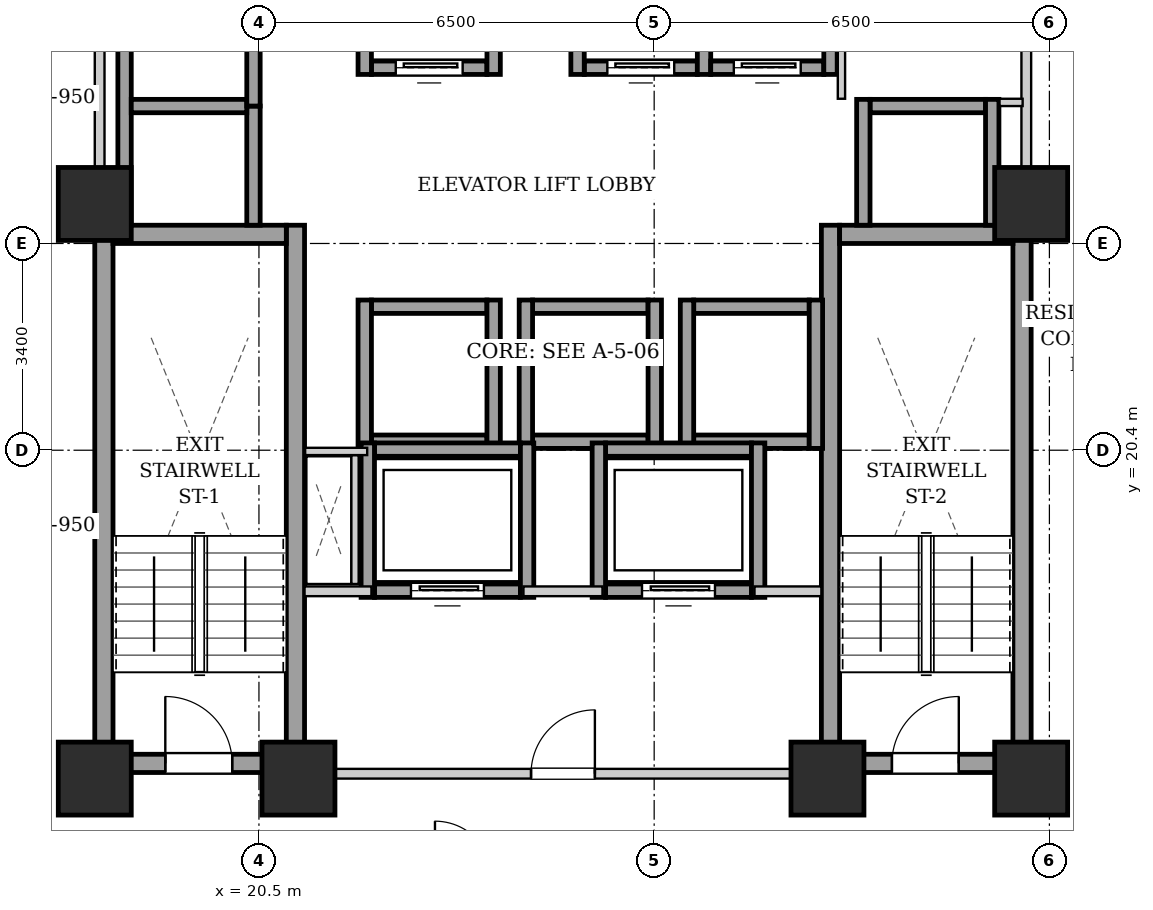
"""IFC4 building model, lengths in metres.
Left out: names, types, materials, properties, quantities, classifications, styles, units other than length and angle.
Written with IfcOpenShell. Run it as: python <this file> out.ifc"""

import sys

from ifc_helpers import new_model, si_unit, direction, frame, frame_2d, origin, origin_2d, place, context, subcontext, project, spatial, rectangle, extrude, element, fill, save


model = new_model("IFC4")
c1 = context("Model", 3, precision=1e-05, world=origin(), true_north=direction((0.0, 1.0)))
c2 = subcontext(c1, "Body", "Model", "MODEL_VIEW")
j1 = project(units=[si_unit("LENGTHUNIT", "METRE"), si_unit("PLANEANGLEUNIT", "RADIAN")], contexts=[c1])
p1 = place(None, origin())
s1 = spatial("IfcSite", under=j1, at=p1, CompositionType="ELEMENT")
p2 = place(p1, origin())
s2 = spatial("IfcBuilding", under=s1, at=p2, CompositionType="ELEMENT")
p3 = place(p2, frame((0.0, 0.0, 41.8)))
s3 = spatial("IfcBuildingStorey", under=s2, at=p3, CompositionType="ELEMENT", Elevation=41.8)
for number, where, z_axis, x_axis in (
    (1, (17.8, 15.0, 0.0), (0.0, 0.0, 1.0), (1.0, 0.0, 0.0)),
    (2, (21.15, 15.0, 0.0), (0.0, 0.0, 1.0), (1.0, 0.0, 0.0)),
    (3, (29.85, 15.0, 0.0), (0.0, 0.0, 1.0), (1.0, 0.0, 0.0)),
    (4, (33.2, 15.0, 0.0), (0.0, 0.0, 1.0), (1.0, 0.0, 0.0)),
    (5, (17.8, 24.45, 0.0), (0.0, 0.0, 1.0), (1.0, 0.0, 0.0)),
    (6, (33.2, 24.45, 0.0), (0.0, 0.0, 1.0), (1.0, 0.0, 0.0)),
):
    element("IfcColumn", number, at=place(p3, frame(where, z_axis=z_axis, x_axis=x_axis)), inside=s3, PredefinedType="COLUMN", context=c2, shape_type="SweptSolid", body=[
        extrude(rectangle(XDim=1.2, YDim=1.2, at=origin_2d()), origin(), (0.0, 0.0, 1.0), 3.2),
    ])
for number, where, z_axis, x_axis in (
    (7, (17.95, 15.1, 0.0), (0.0, 0.0, 1.0), (0.0, 1.0, 0.0)),
    (8, (21.1, 15.1, 0.0), (0.0, 0.0, 1.0), (0.0, 1.0, 0.0)),
):
    element("IfcWall", number, at=place(p3, frame(where, z_axis=z_axis, x_axis=x_axis)), inside=s3, PredefinedType="SHEAR", context=c2, shape_type="SweptSolid", body=[
        extrude(rectangle(XDim=9.0, YDim=0.3, at=frame_2d((4.5, 0.0))), origin(), (0.0, 0.0, 1.0), 2.94),
    ])
p4 = place(p3, frame((18.1, 23.95, 0.0), z_axis=(0.0, 0.0, 1.0), x_axis=(1.0, 0.0, 0.0)))
e9 = element("IfcWall", 9, at=p4, inside=s3, PredefinedType="SHEAR", context=c2, shape_type="SweptSolid", body=[
    extrude(rectangle(XDim=2.85, YDim=0.3, at=frame_2d((1.425, 0.0))), origin(), (0.0, 0.0, 1.0), 2.94),
])
p5 = place(p3, frame((18.1, 15.25, 0.0), z_axis=(0.0, 0.0, 1.0), x_axis=(1.0, 0.0, 0.0)))
e10 = element("IfcWall", 10, at=p5, inside=s3, PredefinedType="SHEAR", context=c2, shape_type="SweptSolid", body=[
    extrude(rectangle(XDim=2.85, YDim=0.3, at=frame_2d((1.425, 0.0))), origin(), (0.0, 0.0, 1.0), 2.94),
])
p6 = place(p5, frame((0.86, 0.0, 0.0)))
e11 = element("IfcOpeningElement", 11, at=p6, cuts=e10, PredefinedType="OPENING", context=c2, shape_type="SweptSolid", body=[
    extrude(rectangle(XDim=1.1, YDim=2.05, at=frame_2d((0.55, 1.025))), frame((0.0, 0.16, 0.0), z_axis=(0.0, -1.0, 0.0), x_axis=(1.0, 0.0, 0.0)), (0.0, 0.0, 1.0), 0.32),
])
for number, where, z_axis, x_axis in (
    (12, (29.9, 15.1, 0.0), (0.0, 0.0, 1.0), (0.0, 1.0, 0.0)),
    (13, (33.05, 15.1, 0.0), (0.0, 0.0, 1.0), (0.0, 1.0, 0.0)),
):
    element("IfcWall", number, at=place(p3, frame(where, z_axis=z_axis, x_axis=x_axis)), inside=s3, PredefinedType="SHEAR", context=c2, shape_type="SweptSolid", body=[
        extrude(rectangle(XDim=9.0, YDim=0.3, at=frame_2d((4.5, 0.0))), origin(), (0.0, 0.0, 1.0), 2.94),
    ])
p7 = place(p3, frame((30.05, 23.95, 0.0), z_axis=(0.0, 0.0, 1.0), x_axis=(1.0, 0.0, 0.0)))
e14 = element("IfcWall", 14, at=p7, inside=s3, PredefinedType="SHEAR", context=c2, shape_type="SweptSolid", body=[
    extrude(rectangle(XDim=2.85, YDim=0.3, at=frame_2d((1.425, 0.0))), origin(), (0.0, 0.0, 1.0), 2.94),
])
p8 = place(p3, frame((30.05, 15.25, 0.0), z_axis=(0.0, 0.0, 1.0), x_axis=(1.0, 0.0, 0.0)))
e15 = element("IfcWall", 15, at=p8, inside=s3, PredefinedType="SHEAR", context=c2, shape_type="SweptSolid", body=[
    extrude(rectangle(XDim=2.85, YDim=0.3, at=frame_2d((1.425, 0.0))), origin(), (0.0, 0.0, 1.0), 2.94),
])
p9 = place(p8, frame((0.86, 0.0, 0.0)))
e16 = element("IfcOpeningElement", 16, at=p9, cuts=e15, PredefinedType="OPENING", context=c2, shape_type="SweptSolid", body=[
    extrude(rectangle(XDim=1.1, YDim=2.05, at=frame_2d((0.55, 1.025))), frame((0.0, 0.16, 0.0), z_axis=(0.0, -1.0, 0.0), x_axis=(1.0, 0.0, 0.0)), (0.0, 0.0, 1.0), 0.32),
])
p10 = place(p3, frame((22.35, 26.69, 0.0), z_axis=(0.0, 0.0, 1.0), x_axis=(1.0, 0.0, 0.0)))
e17 = element("IfcWall", 17, at=p10, inside=s3, PredefinedType="SHEAR", context=c2, shape_type="SweptSolid", body=[
    extrude(rectangle(XDim=1.9, YDim=0.22, at=frame_2d((0.95, 0.0))), origin(), (0.0, 0.0, 1.0), 2.94),
])
p11 = place(p10, frame((0.4, 0.0, 0.0)))
e18 = element("IfcOpeningElement", 18, at=p11, cuts=e17, PredefinedType="OPENING", context=c2, shape_type="SweptSolid", body=[
    extrude(rectangle(XDim=1.1, YDim=2.15, at=frame_2d((0.55, 1.075))), frame((0.0, 0.12, 0.0), z_axis=(0.0, -1.0, 0.0), x_axis=(1.0, 0.0, 0.0)), (0.0, 0.0, 1.0), 0.24),
])
for number, where, z_axis, x_axis in (
    (19, (22.24, 26.58, 0.0), (0.0, 0.0, 1.0), (0.0, 1.0, 0.0)),
    (20, (24.36, 26.58, 0.0), (0.0, 0.0, 1.0), (0.0, 1.0, 0.0)),
):
    element("IfcWall", number, at=place(p3, frame(where, z_axis=z_axis, x_axis=x_axis)), inside=s3, PredefinedType="SHEAR", context=c2, shape_type="SweptSolid", body=[
        extrude(rectangle(XDim=2.44, YDim=0.22, at=frame_2d((1.22, 0.0))), origin(), (0.0, 0.0, 1.0), 2.94),
    ])
p12 = place(p3, frame((25.85, 26.69, 0.0), z_axis=(0.0, 0.0, 1.0), x_axis=(1.0, 0.0, 0.0)))
e21 = element("IfcWall", 21, at=p12, inside=s3, PredefinedType="SHEAR", context=c2, shape_type="SweptSolid", body=[
    extrude(rectangle(XDim=1.86, YDim=0.22, at=frame_2d((0.93, 0.0))), origin(), (0.0, 0.0, 1.0), 2.94),
])
p13 = place(p12, frame((0.38, 0.0, 0.0)))
e22 = element("IfcOpeningElement", 22, at=p13, cuts=e21, PredefinedType="OPENING", context=c2, shape_type="SweptSolid", body=[
    extrude(rectangle(XDim=1.1, YDim=2.15, at=frame_2d((0.55, 1.075))), frame((0.0, 0.12, 0.0), z_axis=(0.0, -1.0, 0.0), x_axis=(1.0, 0.0, 0.0)), (0.0, 0.0, 1.0), 0.24),
])
for number, where, z_axis, x_axis in (
    (23, (25.74, 26.58, 0.0), (0.0, 0.0, 1.0), (0.0, 1.0, 0.0)),
    (24, (27.82, 26.58, 0.0), (0.0, 0.0, 1.0), (0.0, 1.0, 0.0)),
):
    element("IfcWall", number, at=place(p3, frame(where, z_axis=z_axis, x_axis=x_axis)), inside=s3, PredefinedType="SHEAR", context=c2, shape_type="SweptSolid", body=[
        extrude(rectangle(XDim=2.44, YDim=0.22, at=frame_2d((1.22, 0.0))), origin(), (0.0, 0.0, 1.0), 2.94),
    ])
p14 = place(p3, frame((27.93, 26.69, 0.0), z_axis=(0.0, 0.0, 1.0), x_axis=(1.0, 0.0, 0.0)))
e25 = element("IfcWall", 25, at=p14, inside=s3, PredefinedType="SHEAR", context=c2, shape_type="SweptSolid", body=[
    extrude(rectangle(XDim=1.86, YDim=0.22, at=frame_2d((0.93, 0.0))), origin(), (0.0, 0.0, 1.0), 2.94),
])
p15 = place(p14, frame((0.38, 0.0, 0.0)))
e26 = element("IfcOpeningElement", 26, at=p15, cuts=e25, PredefinedType="OPENING", context=c2, shape_type="SweptSolid", body=[
    extrude(rectangle(XDim=1.1, YDim=2.15, at=frame_2d((0.55, 1.075))), frame((0.0, 0.12, 0.0), z_axis=(0.0, -1.0, 0.0), x_axis=(1.0, 0.0, 0.0)), (0.0, 0.0, 1.0), 0.24),
])
p16 = place(p3, frame((29.9, 26.58, 0.0), z_axis=(0.0, 0.0, 1.0), x_axis=(0.0, 1.0, 0.0)))
e27 = element("IfcWall", 27, at=p16, inside=s3, PredefinedType="SHEAR", context=c2, shape_type="SweptSolid", body=[
    extrude(rectangle(XDim=2.44, YDim=0.22, at=frame_2d((1.22, 0.0))), origin(), (0.0, 0.0, 1.0), 2.94),
])
for number, where, z_axis, x_axis in (
    (28, (22.35, 20.54, 0.0), (0.0, 0.0, 1.0), (1.0, 0.0, 0.0)),
    (29, (22.35, 22.76, 0.0), (0.0, 0.0, 1.0), (1.0, 0.0, 0.0)),
):
    element("IfcWall", number, at=place(p3, frame(where, z_axis=z_axis, x_axis=x_axis)), inside=s3, PredefinedType="SHEAR", context=c2, shape_type="SweptSolid", body=[
        extrude(rectangle(XDim=1.9, YDim=0.22, at=frame_2d((0.95, 0.0))), origin(), (0.0, 0.0, 1.0), 2.94),
    ])
for number, where, z_axis, x_axis in (
    (30, (22.24, 20.43, 0.0), (0.0, 0.0, 1.0), (0.0, 1.0, 0.0)),
    (31, (24.36, 20.43, 0.0), (0.0, 0.0, 1.0), (0.0, 1.0, 0.0)),
):
    element("IfcWall", number, at=place(p3, frame(where, z_axis=z_axis, x_axis=x_axis)), inside=s3, PredefinedType="SHEAR", context=c2, shape_type="SweptSolid", body=[
        extrude(rectangle(XDim=2.44, YDim=0.22, at=frame_2d((1.22, 0.0))), origin(), (0.0, 0.0, 1.0), 2.94),
    ])
for number, where, z_axis, x_axis in (
    (32, (25.0, 20.54, 0.0), (0.0, 0.0, 1.0), (1.0, 0.0, 0.0)),
    (33, (25.0, 22.76, 0.0), (0.0, 0.0, 1.0), (1.0, 0.0, 0.0)),
):
    element("IfcWall", number, at=place(p3, frame(where, z_axis=z_axis, x_axis=x_axis)), inside=s3, PredefinedType="SHEAR", context=c2, shape_type="SweptSolid", body=[
        extrude(rectangle(XDim=1.9, YDim=0.22, at=frame_2d((0.95, 0.0))), origin(), (0.0, 0.0, 1.0), 2.94),
    ])
for number, where, z_axis, x_axis in (
    (34, (24.89, 20.43, 0.0), (0.0, 0.0, 1.0), (0.0, 1.0, 0.0)),
    (35, (27.01, 20.43, 0.0), (0.0, 0.0, 1.0), (0.0, 1.0, 0.0)),
):
    element("IfcWall", number, at=place(p3, frame(where, z_axis=z_axis, x_axis=x_axis)), inside=s3, PredefinedType="SHEAR", context=c2, shape_type="SweptSolid", body=[
        extrude(rectangle(XDim=2.44, YDim=0.22, at=frame_2d((1.22, 0.0))), origin(), (0.0, 0.0, 1.0), 2.94),
    ])
for number, where, z_axis, x_axis in (
    (36, (27.65, 20.54, 0.0), (0.0, 0.0, 1.0), (1.0, 0.0, 0.0)),
    (37, (27.65, 22.76, 0.0), (0.0, 0.0, 1.0), (1.0, 0.0, 0.0)),
):
    element("IfcWall", number, at=place(p3, frame(where, z_axis=z_axis, x_axis=x_axis)), inside=s3, PredefinedType="SHEAR", context=c2, shape_type="SweptSolid", body=[
        extrude(rectangle(XDim=1.9, YDim=0.22, at=frame_2d((0.95, 0.0))), origin(), (0.0, 0.0, 1.0), 2.94),
    ])
for number, where, z_axis, x_axis in (
    (38, (27.54, 20.43, 0.0), (0.0, 0.0, 1.0), (0.0, 1.0, 0.0)),
    (39, (29.66, 20.43, 0.0), (0.0, 0.0, 1.0), (0.0, 1.0, 0.0)),
):
    element("IfcWall", number, at=place(p3, frame(where, z_axis=z_axis, x_axis=x_axis)), inside=s3, PredefinedType="SHEAR", context=c2, shape_type="SweptSolid", body=[
        extrude(rectangle(XDim=2.44, YDim=0.22, at=frame_2d((1.22, 0.0))), origin(), (0.0, 0.0, 1.0), 2.94),
    ])
p17 = place(p3, frame((18.29, 24.1, 0.0), z_axis=(0.0, 0.0, 1.0), x_axis=(0.0, 1.0, 0.0)))
e40 = element("IfcWall", 40, at=p17, inside=s3, PredefinedType="SHEAR", context=c2, shape_type="SweptSolid", body=[
    extrude(rectangle(XDim=4.14, YDim=0.22, at=frame_2d((2.07, 0.0))), origin(), (0.0, 0.0, 1.0), 2.94),
])
p18 = place(p3, frame((20.41, 24.1, 0.0), z_axis=(0.0, 0.0, 1.0), x_axis=(0.0, 1.0, 0.0)))
e41 = element("IfcWall", 41, at=p18, inside=s3, PredefinedType="SHEAR", context=c2, shape_type="SweptSolid", body=[
    extrude(rectangle(XDim=1.96, YDim=0.22, at=frame_2d((0.98, 0.0))), origin(), (0.0, 0.0, 1.0), 2.94),
])
p19 = place(p3, frame((18.4, 26.06, 0.0), z_axis=(0.0, 0.0, 1.0), x_axis=(1.0, 0.0, 0.0)))
e42 = element("IfcWall", 42, at=p19, inside=s3, PredefinedType="SHEAR", context=c2, shape_type="SweptSolid", body=[
    extrude(rectangle(XDim=1.9, YDim=0.22, at=frame_2d((0.95, 0.0))), origin(), (0.0, 0.0, 1.0), 2.94),
])
p20 = place(p3, frame((20.41, 26.06, 0.0), z_axis=(0.0, 0.0, 1.0), x_axis=(0.0, 1.0, 0.0)))
e43 = element("IfcWall", 43, at=p20, inside=s3, PredefinedType="SHEAR", context=c2, shape_type="SweptSolid", body=[
    extrude(rectangle(XDim=2.18, YDim=0.22, at=frame_2d((1.09, 0.0))), origin(), (0.0, 0.0, 1.0), 2.94),
])
p21 = place(p3, frame((30.55, 26.06, 0.0), z_axis=(0.0, 0.0, 1.0), x_axis=(1.0, 0.0, 0.0)))
e44 = element("IfcWall", 44, at=p21, inside=s3, PredefinedType="SHEAR", context=c2, shape_type="SweptSolid", body=[
    extrude(rectangle(XDim=1.9, YDim=0.22, at=frame_2d((0.95, 0.0))), origin(), (0.0, 0.0, 1.0), 2.94),
])
for number, where, z_axis, x_axis in (
    (45, (30.44, 24.1, 0.0), (0.0, 0.0, 1.0), (0.0, 1.0, 0.0)),
    (46, (32.56, 24.1, 0.0), (0.0, 0.0, 1.0), (0.0, 1.0, 0.0)),
):
    element("IfcWall", number, at=place(p3, frame(where, z_axis=z_axis, x_axis=x_axis)), inside=s3, PredefinedType="SHEAR", context=c2, shape_type="SweptSolid", body=[
        extrude(rectangle(XDim=2.07, YDim=0.22, at=frame_2d((1.035, 0.0))), origin(), (0.0, 0.0, 1.0), 2.94),
    ])
p22 = place(p3, frame((22.4, 18.09, 0.0), z_axis=(0.0, 0.0, 1.0), x_axis=(1.0, 0.0, 0.0)))
e47 = element("IfcWall", 47, at=p22, inside=s3, PredefinedType="SHEAR", context=c2, shape_type="SweptSolid", body=[
    extrude(rectangle(XDim=2.4, YDim=0.22, at=frame_2d((1.2, 0.0))), origin(), (0.0, 0.0, 1.0), 2.94),
])
p23 = place(p22, frame((0.6, 0.0, 0.0)))
e48 = element("IfcOpeningElement", 48, at=p23, cuts=e47, PredefinedType="OPENING", context=c2, shape_type="SweptSolid", body=[
    extrude(rectangle(XDim=1.2, YDim=2.15, at=frame_2d((0.6, 1.075))), frame((0.0, 0.12, 0.0), z_axis=(0.0, -1.0, 0.0), x_axis=(1.0, 0.0, 0.0)), (0.0, 0.0, 1.0), 0.24),
])
p24 = place(p3, frame((22.4, 20.41, 0.0), z_axis=(0.0, 0.0, 1.0), x_axis=(1.0, 0.0, 0.0)))
e49 = element("IfcWall", 49, at=p24, inside=s3, PredefinedType="SHEAR", context=c2, shape_type="SweptSolid", body=[
    extrude(rectangle(XDim=2.4, YDim=0.22, at=frame_2d((1.2, 0.0))), origin(), (0.0, 0.0, 1.0), 2.94),
])
for number, where, z_axis, x_axis in (
    (50, (22.29, 17.98, 0.0), (0.0, 0.0, 1.0), (0.0, 1.0, 0.0)),
    (51, (24.91, 17.98, 0.0), (0.0, 0.0, 1.0), (0.0, 1.0, 0.0)),
):
    element("IfcWall", number, at=place(p3, frame(where, z_axis=z_axis, x_axis=x_axis)), inside=s3, PredefinedType="SHEAR", context=c2, shape_type="SweptSolid", body=[
        extrude(rectangle(XDim=2.54, YDim=0.22, at=frame_2d((1.27, 0.0))), origin(), (0.0, 0.0, 1.0), 2.94),
    ])
p25 = place(p3, frame((26.2, 18.09, 0.0), z_axis=(0.0, 0.0, 1.0), x_axis=(1.0, 0.0, 0.0)))
e52 = element("IfcWall", 52, at=p25, inside=s3, PredefinedType="SHEAR", context=c2, shape_type="SweptSolid", body=[
    extrude(rectangle(XDim=2.4, YDim=0.22, at=frame_2d((1.2, 0.0))), origin(), (0.0, 0.0, 1.0), 2.94),
])
p26 = place(p25, frame((0.6, 0.0, 0.0)))
e53 = element("IfcOpeningElement", 53, at=p26, cuts=e52, PredefinedType="OPENING", context=c2, shape_type="SweptSolid", body=[
    extrude(rectangle(XDim=1.2, YDim=2.15, at=frame_2d((0.6, 1.075))), frame((0.0, 0.12, 0.0), z_axis=(0.0, -1.0, 0.0), x_axis=(1.0, 0.0, 0.0)), (0.0, 0.0, 1.0), 0.24),
])
p27 = place(p3, frame((26.2, 20.41, 0.0), z_axis=(0.0, 0.0, 1.0), x_axis=(1.0, 0.0, 0.0)))
e54 = element("IfcWall", 54, at=p27, inside=s3, PredefinedType="SHEAR", context=c2, shape_type="SweptSolid", body=[
    extrude(rectangle(XDim=2.4, YDim=0.22, at=frame_2d((1.2, 0.0))), origin(), (0.0, 0.0, 1.0), 2.94),
])
for number, where, z_axis, x_axis in (
    (55, (26.09, 17.98, 0.0), (0.0, 0.0, 1.0), (0.0, 1.0, 0.0)),
    (56, (28.71, 17.98, 0.0), (0.0, 0.0, 1.0), (0.0, 1.0, 0.0)),
):
    element("IfcWall", number, at=place(p3, frame(where, z_axis=z_axis, x_axis=x_axis)), inside=s3, PredefinedType="SHEAR", context=c2, shape_type="SweptSolid", body=[
        extrude(rectangle(XDim=2.54, YDim=0.22, at=frame_2d((1.27, 0.0))), origin(), (0.0, 0.0, 1.0), 2.94),
    ])
p28 = place(p3, frame((21.25, 15.08, 0.0), z_axis=(0.0, 0.0, 1.0), x_axis=(1.0, 0.0, 0.0)))
e57 = element("IfcWall", 57, at=p28, inside=s3, PredefinedType="PARTITIONING", context=c2, shape_type="SweptSolid", body=[
    extrude(rectangle(XDim=8.5, YDim=0.16, at=frame_2d((4.25, 0.0))), origin(), (0.0, 0.0, 1.0), 2.155),
])
p29 = place(p28, frame((3.725, 0.0, 0.0)))
e58 = element("IfcOpeningElement", 58, at=p29, cuts=e57, PredefinedType="OPENING", context=c2, shape_type="SweptSolid", body=[
    extrude(rectangle(XDim=1.05, YDim=2.05, at=frame_2d((0.525, 1.025))), frame((0.0, 0.09, 0.0), z_axis=(0.0, -1.0, 0.0), x_axis=(1.0, 0.0, 0.0)), (0.0, 0.0, 1.0), 0.18),
])
p30 = place(p3, frame((21.25, 18.08, 0.0), z_axis=(0.0, 0.0, 1.0), x_axis=(1.0, 0.0, 0.0)))
e59 = element("IfcWall", 59, at=p30, inside=s3, PredefinedType="PARTITIONING", context=c2, shape_type="SweptSolid", body=[
    extrude(rectangle(XDim=1.1, YDim=0.16, at=frame_2d((0.55, 0.0))), origin(), (0.0, 0.0, 1.0), 2.94),
])
p31 = place(p3, frame((24.85, 18.08, 0.0), z_axis=(0.0, 0.0, 1.0), x_axis=(1.0, 0.0, 0.0)))
e60 = element("IfcWall", 60, at=p31, inside=s3, PredefinedType="PARTITIONING", context=c2, shape_type="SweptSolid", body=[
    extrude(rectangle(XDim=1.3, YDim=0.16, at=frame_2d((0.65, 0.0))), origin(), (0.0, 0.0, 1.0), 2.94),
])
p32 = place(p3, frame((28.65, 18.08, 0.0), z_axis=(0.0, 0.0, 1.0), x_axis=(1.0, 0.0, 0.0)))
e61 = element("IfcWall", 61, at=p32, inside=s3, PredefinedType="PARTITIONING", context=c2, shape_type="SweptSolid", body=[
    extrude(rectangle(XDim=1.1, YDim=0.16, at=frame_2d((0.55, 0.0))), origin(), (0.0, 0.0, 1.0), 2.94),
])
for number, where, z_axis, x_axis in (
    (62, (17.88, 24.12, 0.0), (0.0, 0.0, 1.0), (0.0, 1.0, 0.0)),
    (63, (33.12, 24.12, 0.0), (0.0, 0.0, 1.0), (0.0, 1.0, 0.0)),
):
    element("IfcWall", number, at=place(p3, frame(where, z_axis=z_axis, x_axis=x_axis)), inside=s3, PredefinedType="PARTITIONING", context=c2, shape_type="SweptSolid", body=[
        extrude(rectangle(XDim=4.76, YDim=0.16, at=frame_2d((2.38, 0.0))), origin(), (0.0, 0.0, 1.0), 2.94),
    ])
p33 = place(p3, frame((22.08, 18.2, 0.0), z_axis=(0.0, 0.0, 1.0), x_axis=(0.0, 1.0, 0.0)))
e64 = element("IfcWall", 64, at=p33, inside=s3, PredefinedType="PARTITIONING", context=c2, shape_type="SweptSolid", body=[
    extrude(rectangle(XDim=2.12, YDim=0.12, at=frame_2d((1.06, 0.0))), origin(), (0.0, 0.0, 1.0), 2.94),
])
p34 = place(p3, frame((22.28, 20.38, 0.0), z_axis=(0.0, 0.0, 1.0), x_axis=(-1.0, 0.0, 0.0)))
e65 = element("IfcWall", 65, at=p34, inside=s3, PredefinedType="PARTITIONING", context=c2, shape_type="SweptSolid", body=[
    extrude(rectangle(XDim=1.02, YDim=0.12, at=frame_2d((0.51, 0.0))), origin(), (0.0, 0.0, 1.0), 2.94),
])
p35 = place(p3, frame((30.08, 26.18, 0.0), z_axis=(0.0, 0.0, 1.0), x_axis=(0.0, 1.0, 0.0)))
e66 = element("IfcWall", 66, at=p35, inside=s3, PredefinedType="PARTITIONING", context=c2, shape_type="SweptSolid", body=[
    extrude(rectangle(XDim=2.68, YDim=0.12, at=frame_2d((1.34, 0.0))), origin(), (0.0, 0.0, 1.0), 2.94),
])
p36 = place(p3, frame((32.68, 26.12, 0.0), z_axis=(0.0, 0.0, 1.0), x_axis=(1.0, 0.0, 0.0)))
e67 = element("IfcWall", 67, at=p36, inside=s3, PredefinedType="PARTITIONING", context=c2, shape_type="SweptSolid", body=[
    extrude(rectangle(XDim=0.38, YDim=0.12, at=frame_2d((0.19, 0.0))), origin(), (0.0, 0.0, 1.0), 2.94),
])
p37 = place(p6, origin())
e68 = element("IfcDoor", 68, at=p37, inside=s3, OperationType="SINGLE_SWING_LEFT", PredefinedType="DOOR", context=c2, shape_type="SweptSolid", body=[
    extrude(rectangle(XDim=1.1, YDim=2.05, at=frame_2d((0.55, 1.025))), frame((0.0, 0.025, 0.0), z_axis=(0.0, -1.0, 0.0), x_axis=(1.0, 0.0, 0.0)), (0.0, 0.0, 1.0), 0.05),
])
fill(e11, e68)
p38 = place(p9, origin())
e69 = element("IfcDoor", 69, at=p38, inside=s3, OperationType="SINGLE_SWING_RIGHT", PredefinedType="DOOR", context=c2, shape_type="SweptSolid", body=[
    extrude(rectangle(XDim=1.1, YDim=2.05, at=frame_2d((0.55, 1.025))), frame((0.0, 0.025, 0.0), z_axis=(0.0, -1.0, 0.0), x_axis=(1.0, 0.0, 0.0)), (0.0, 0.0, 1.0), 0.05),
])
fill(e16, e69)
p39 = place(p11, origin())
e70 = element("IfcDoor", 70, at=p39, inside=s3, OperationType="SLIDING_TO_LEFT", PredefinedType="DOOR", context=c2, shape_type="SweptSolid", body=[
    extrude(rectangle(XDim=1.1, YDim=2.15, at=frame_2d((0.55, 1.075))), frame((0.0, 0.025, 0.0), z_axis=(0.0, -1.0, 0.0), x_axis=(1.0, 0.0, 0.0)), (0.0, 0.0, 1.0), 0.05),
])
fill(e18, e70)
p40 = place(p13, origin())
e71 = element("IfcDoor", 71, at=p40, inside=s3, OperationType="SLIDING_TO_LEFT", PredefinedType="DOOR", context=c2, shape_type="SweptSolid", body=[
    extrude(rectangle(XDim=1.1, YDim=2.15, at=frame_2d((0.55, 1.075))), frame((0.0, 0.025, 0.0), z_axis=(0.0, -1.0, 0.0), x_axis=(1.0, 0.0, 0.0)), (0.0, 0.0, 1.0), 0.05),
])
fill(e22, e71)
p41 = place(p15, origin())
e72 = element("IfcDoor", 72, at=p41, inside=s3, OperationType="SLIDING_TO_LEFT", PredefinedType="DOOR", context=c2, shape_type="SweptSolid", body=[
    extrude(rectangle(XDim=1.1, YDim=2.15, at=frame_2d((0.55, 1.075))), frame((0.0, 0.025, 0.0), z_axis=(0.0, -1.0, 0.0), x_axis=(1.0, 0.0, 0.0)), (0.0, 0.0, 1.0), 0.05),
])
fill(e26, e72)
p42 = place(p23, origin())
e73 = element("IfcDoor", 73, at=p42, inside=s3, OperationType="SLIDING_TO_LEFT", PredefinedType="DOOR", context=c2, shape_type="SweptSolid", body=[
    extrude(rectangle(XDim=1.2, YDim=2.15, at=frame_2d((0.6, 1.075))), frame((0.0, 0.025, 0.0), z_axis=(0.0, -1.0, 0.0), x_axis=(1.0, 0.0, 0.0)), (0.0, 0.0, 1.0), 0.05),
])
fill(e48, e73)
p43 = place(p26, origin())
e74 = element("IfcDoor", 74, at=p43, inside=s3, OperationType="SLIDING_TO_LEFT", PredefinedType="DOOR", context=c2, shape_type="SweptSolid", body=[
    extrude(rectangle(XDim=1.2, YDim=2.15, at=frame_2d((0.6, 1.075))), frame((0.0, 0.025, 0.0), z_axis=(0.0, -1.0, 0.0), x_axis=(1.0, 0.0, 0.0)), (0.0, 0.0, 1.0), 0.05),
])
fill(e53, e74)
p44 = place(p29, origin())
e75 = element("IfcDoor", 75, at=p44, inside=s3, OperationType="SINGLE_SWING_RIGHT", PredefinedType="DOOR", context=c2, shape_type="SweptSolid", body=[
    extrude(rectangle(XDim=1.05, YDim=2.05, at=frame_2d((0.525, 1.025))), frame((0.0, 0.025, 0.0), z_axis=(0.0, -1.0, 0.0), x_axis=(1.0, 0.0, 0.0)), (0.0, 0.0, 1.0), 0.05),
])
fill(e58, e75)
save(model, sys.argv[1])
